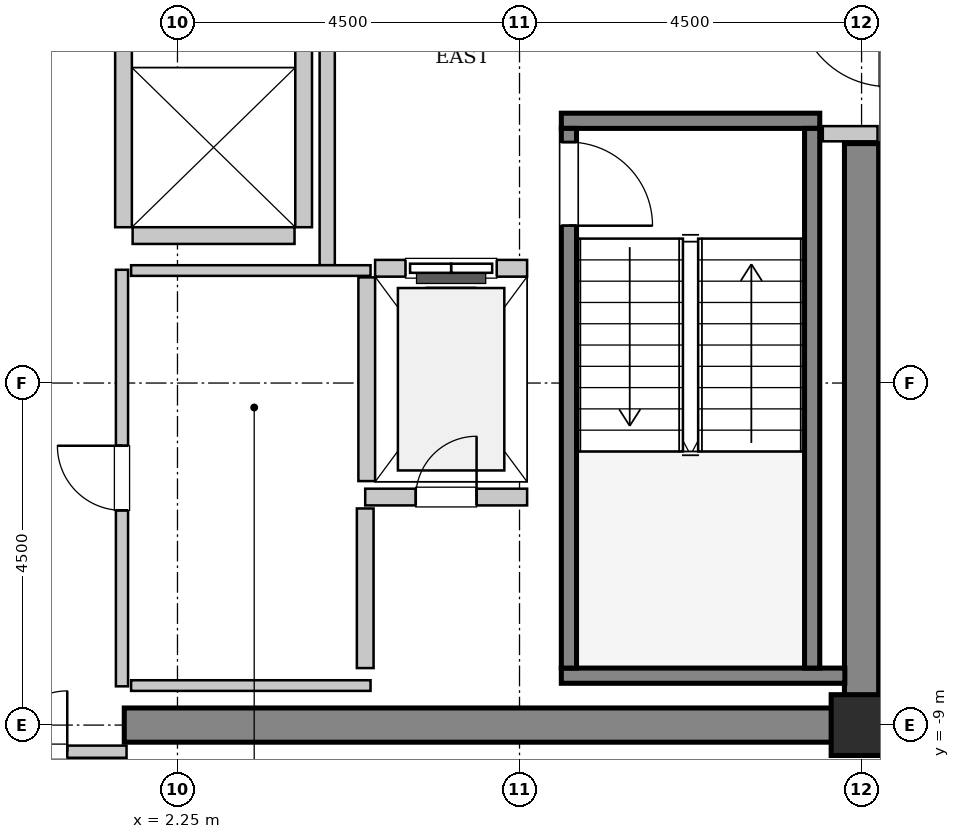
"""IFC4 building model, lengths in metres.
Left out: names, types, materials, properties, quantities, classifications, styles, units other than length and angle.
Written with IfcOpenShell. Run it as: python <this file> out.ifc"""

import sys

from ifc_helpers import new_model, si_unit, direction, frame, frame_2d, origin, origin_2d, place, context, subcontext, project, spatial, rectangle, hollow_rectangle, extrude, source, transform, mapped, element, fill, save


model = new_model("IFC4")
c1 = context("Model", 3, precision=1e-05, world=origin(), true_north=direction((0.0, 1.0)))
c2 = subcontext(c1, "Body", "Model", "MODEL_VIEW")
j1 = project(units=[si_unit("LENGTHUNIT", "METRE"), si_unit("PLANEANGLEUNIT", "RADIAN")], contexts=[c1])
p1 = place(None, origin())
s1 = spatial("IfcSite", under=j1, at=p1, CompositionType="ELEMENT")
p2 = place(p1, origin())
s2 = spatial("IfcBuilding", under=s1, at=p2, CompositionType="ELEMENT")
p3 = place(p2, frame((0.0, 0.0, 291.2)))
s3 = spatial("IfcBuildingStorey", under=s2, at=p3, CompositionType="ELEMENT", Elevation=291.2)
m1 = source(origin(), c2, "Body", "SweptSolid", [
    extrude(rectangle(XDim=9.925, YDim=0.45, at=frame_2d((4.962, 0.0))), origin(), (0.0, 0.0, 1.0), 3.8),
])
p4 = place(p3, frame((1.55, -9.0, 0.0), z_axis=(0.0, 0.0, 1.0), x_axis=(1.0, 0.0, 0.0)))
e1 = element("IfcWall", 1, at=p4, inside=s3, PredefinedType="SHEAR", context=c2, shape_type="MappedRepresentation", body=[
    mapped(m1, transform((0.0, 0.0, 0.0), x_axis=(1.0, 0.0, 0.0), y_axis=(0.0, 1.0, 0.0), z_axis=(0.0, 0.0, 1.0), scale=1.0)),
])
m2 = source(origin(), c2, "Body", "SweptSolid", [
    extrude(rectangle(XDim=7.425, YDim=0.45, at=frame_2d((3.712, 0.0))), origin(), (0.0, 0.0, 1.0), 3.8),
])
p5 = place(p3, frame((11.25, -8.775, 0.0), z_axis=(0.0, 0.0, 1.0), x_axis=(0.0, 1.0, 0.0)))
e2 = element("IfcWall", 2, at=p5, inside=s3, PredefinedType="SHEAR", context=c2, shape_type="MappedRepresentation", body=[
    mapped(m2, transform((0.0, 0.0, 0.0), x_axis=(1.0, 0.0, 0.0), y_axis=(0.0, 1.0, 0.0), z_axis=(0.0, 0.0, 1.0), scale=1.0)),
])
m3 = source(origin(), c2, "Body", "SweptSolid", [
    extrude(hollow_rectangle(XDim=0.8, YDim=0.8, WallThickness=0.04, InnerFilletRadius=0.04, OuterFilletRadius=0.08, at=origin_2d()), origin(), (0.0, 0.0, 1.0), 3.8),
])
p6 = place(p3, frame((11.25, -9.0, 0.0), z_axis=(0.0, 0.0, 1.0), x_axis=(1.0, 0.0, 0.0)))
e3 = element("IfcColumn", 3, at=p6, inside=s3, PredefinedType="COLUMN", context=c2, shape_type="MappedRepresentation", body=[
    mapped(m3, transform((0.0, 0.0, 0.0), x_axis=(1.0, 0.0, 0.0), y_axis=(0.0, 1.0, 0.0), z_axis=(0.0, 0.0, 1.0), scale=1.0)),
])
m4 = source(origin(), c2, "Body", "SweptSolid", [
    extrude(rectangle(XDim=3.4, YDim=0.2, at=frame_2d((1.7, 0.0))), origin(), (0.0, 0.0, 1.0), 3.8),
])
p7 = place(p3, frame((7.3, -1.05, 0.0), z_axis=(0.0, 0.0, 1.0), x_axis=(1.0, 0.0, 0.0)))
e4 = element("IfcWall", 4, at=p7, inside=s3, PredefinedType="SOLIDWALL", context=c2, shape_type="MappedRepresentation", body=[
    mapped(m4, transform((0.0, 0.0, 0.0), x_axis=(1.0, 0.0, 0.0), y_axis=(0.0, 1.0, 0.0), z_axis=(0.0, 0.0, 1.0), scale=1.0)),
])
m5 = source(origin(), c2, "Body", "SweptSolid", [
    extrude(rectangle(XDim=3.73, YDim=0.2, at=frame_2d((1.865, 0.0))), origin(), (0.0, 0.0, 1.0), 3.8),
])
p8 = place(p3, frame((7.3, -8.35, 0.0), z_axis=(0.0, 0.0, 1.0), x_axis=(1.0, 0.0, 0.0)))
e5 = element("IfcWall", 5, at=p8, inside=s3, PredefinedType="SOLIDWALL", context=c2, shape_type="MappedRepresentation", body=[
    mapped(m5, transform((0.0, 0.0, 0.0), x_axis=(1.0, 0.0, 0.0), y_axis=(0.0, 1.0, 0.0), z_axis=(0.0, 0.0, 1.0), scale=1.0)),
])
m6 = source(origin(), c2, "Body", "SweptSolid", [
    extrude(rectangle(XDim=7.1, YDim=0.2, at=frame_2d((3.55, 0.0))), origin(), (0.0, 0.0, 1.0), 3.8),
])
p9 = place(p3, frame((7.4, -1.15, 0.0), z_axis=(0.0, 0.0, 1.0), x_axis=(0.0, -1.0, 0.0)))
e6 = element("IfcWall", 6, at=p9, inside=s3, PredefinedType="SOLIDWALL", context=c2, shape_type="MappedRepresentation", body=[
    mapped(m6, transform((0.0, 0.0, 0.0), x_axis=(1.0, 0.0, 0.0), y_axis=(0.0, 1.0, 0.0), z_axis=(0.0, 0.0, 1.0), scale=1.0)),
])
p10 = place(p9, frame((0.18, 0.0, 0.0)))
e7 = element("IfcOpeningElement", 7, at=p10, cuts=e6, PredefinedType="OPENING", context=c2, shape_type="SweptSolid", body=[
    extrude(rectangle(XDim=1.1, YDim=2.15, at=frame_2d((0.55, 1.075))), frame((0.0, 0.11, 0.0), z_axis=(0.0, -1.0, 0.0), x_axis=(1.0, 0.0, 0.0)), (0.0, 0.0, 1.0), 0.22),
])
p11 = place(p3, frame((10.6, -1.15, 0.0), z_axis=(0.0, 0.0, 1.0), x_axis=(0.0, -1.0, 0.0)))
e8 = element("IfcWall", 8, at=p11, inside=s3, PredefinedType="SOLIDWALL", context=c2, shape_type="MappedRepresentation", body=[
    mapped(m6, transform((0.0, 0.0, 0.0), x_axis=(1.0, 0.0, 0.0), y_axis=(0.0, 1.0, 0.0), z_axis=(0.0, 0.0, 1.0), scale=1.0)),
])
m7 = source(origin(), c2, "Body", "SweptSolid", [
    extrude(rectangle(XDim=2.0, YDim=0.22, at=frame_2d((1.0, 0.0))), origin(), (0.0, 0.0, 1.0), 3.535),
])
p12 = place(p3, frame((6.85, -2.99, 0.0), z_axis=(0.0, 0.0, 1.0), x_axis=(-1.0, 0.0, 0.0)))
e9 = element("IfcWall", 9, at=p12, inside=s3, PredefinedType="SOLIDWALL", context=c2, shape_type="MappedRepresentation", body=[
    mapped(m7, transform((0.0, 0.0, 0.0), x_axis=(1.0, 0.0, 0.0), y_axis=(0.0, 1.0, 0.0), z_axis=(0.0, 0.0, 1.0), scale=1.0)),
])
p13 = place(p12, frame((0.4, 0.0, 0.0)))
e10 = element("IfcOpeningElement", 10, at=p13, cuts=e9, PredefinedType="OPENING", context=c2, shape_type="SweptSolid", body=[
    extrude(rectangle(XDim=1.2, YDim=2.2, at=frame_2d((0.6, 1.1))), frame((0.0, 0.12, 0.0), z_axis=(0.0, -1.0, 0.0), x_axis=(1.0, 0.0, 0.0)), (0.0, 0.0, 1.0), 0.24),
])
m8 = source(origin(), c2, "Body", "SweptSolid", [
    extrude(rectangle(XDim=2.68, YDim=0.22, at=frame_2d((1.34, 0.0))), origin(), (0.0, 0.0, 1.0), 3.535),
])
p14 = place(p3, frame((4.74, -3.11, 0.0), z_axis=(0.0, 0.0, 1.0), x_axis=(0.0, -1.0, 0.0)))
e11 = element("IfcWall", 11, at=p14, inside=s3, PredefinedType="SOLIDWALL", context=c2, shape_type="MappedRepresentation", body=[
    mapped(m8, transform((0.0, 0.0, 0.0), x_axis=(1.0, 0.0, 0.0), y_axis=(0.0, 1.0, 0.0), z_axis=(0.0, 0.0, 1.0), scale=1.0)),
])
m9 = source(origin(), c2, "Body", "SweptSolid", [
    extrude(rectangle(XDim=4.9, YDim=0.22, at=frame_2d((2.45, 0.0))), origin(), (0.0, 0.0, 1.0), 3.535),
])
for number, where, z_axis, x_axis in (
    (12, (1.54, 2.45, 0.0), (0.0, 0.0, 1.0), (0.0, -1.0, 0.0)),
    (13, (3.91, -2.45, 0.0), (0.0, 0.0, 1.0), (0.0, 1.0, 0.0)),
):
    element("IfcWall", number, at=place(p3, frame(where, z_axis=z_axis, x_axis=x_axis)), inside=s3, PredefinedType="SOLIDWALL", context=c2, shape_type="MappedRepresentation", body=[
        mapped(m9, transform((0.0, 0.0, 0.0), x_axis=(1.0, 0.0, 0.0), y_axis=(0.0, 1.0, 0.0), z_axis=(0.0, 0.0, 1.0), scale=1.0)),
    ])
m10 = source(origin(), c2, "Body", "SweptSolid", [
    extrude(rectangle(XDim=2.13, YDim=0.22, at=frame_2d((1.065, 0.0))), origin(), (0.0, 0.0, 1.0), 3.535),
])
p15 = place(p3, frame((1.66, -2.56, 0.0), z_axis=(0.0, 0.0, 1.0), x_axis=(1.0, 0.0, 0.0)))
e14 = element("IfcWall", 14, at=p15, inside=s3, PredefinedType="SOLIDWALL", context=c2, shape_type="MappedRepresentation", body=[
    mapped(m10, transform((0.0, 0.0, 0.0), x_axis=(1.0, 0.0, 0.0), y_axis=(0.0, 1.0, 0.0), z_axis=(0.0, 0.0, 1.0), scale=1.0)),
])
p16 = place(p3, frame((4.72, -6.0, 0.0), z_axis=(0.0, 0.0, 1.0), x_axis=(1.0, 0.0, 0.0)))
e15 = element("IfcWall", 15, at=p16, inside=s3, PredefinedType="SOLIDWALL", context=c2, shape_type="MappedRepresentation", body=[
    mapped(m10, transform((0.0, 0.0, 0.0), x_axis=(1.0, 0.0, 0.0), y_axis=(0.0, 1.0, 0.0), z_axis=(0.0, 0.0, 1.0), scale=1.0)),
])
p17 = place(p16, frame((0.665, 0.0, 0.0)))
e16 = element("IfcOpeningElement", 16, at=p17, cuts=e15, PredefinedType="OPENING", context=c2, shape_type="SweptSolid", body=[
    extrude(rectangle(XDim=0.8, YDim=2.0, at=frame_2d((0.4, 1.0))), frame((0.0, 0.12, 0.0), z_axis=(0.0, -1.0, 0.0), x_axis=(1.0, 0.0, 0.0)), (0.0, 0.0, 1.0), 0.24),
])
m11 = source(origin(), c2, "Body", "SweptSolid", [
    extrude(rectangle(XDim=2.1, YDim=0.22, at=frame_2d((1.05, 0.0))), origin(), (0.0, 0.0, 1.0), 3.535),
])
p18 = place(p3, frame((4.72, -8.25, 0.0), z_axis=(0.0, 0.0, 1.0), x_axis=(0.0, 1.0, 0.0)))
e17 = element("IfcWall", 17, at=p18, inside=s3, PredefinedType="SOLIDWALL", context=c2, shape_type="MappedRepresentation", body=[
    mapped(m11, transform((0.0, 0.0, 0.0), x_axis=(1.0, 0.0, 0.0), y_axis=(0.0, 1.0, 0.0), z_axis=(0.0, 0.0, 1.0), scale=1.0)),
])
m12 = source(origin(), c2, "Body", "SweptSolid", [
    extrude(rectangle(XDim=5.9, YDim=0.2, at=frame_2d((2.95, 0.0))), origin(), (0.0, 0.0, 1.0), 3.535),
])
p19 = place(p3, frame((4.22, -2.95, 0.0), z_axis=(0.0, 0.0, 1.0), x_axis=(0.0, 1.0, 0.0)))
e18 = element("IfcWall", 18, at=p19, inside=s3, PredefinedType="PARTITIONING", context=c2, shape_type="MappedRepresentation", body=[
    mapped(m12, transform((0.0, 0.0, 0.0), x_axis=(1.0, 0.0, 0.0), y_axis=(0.0, 1.0, 0.0), z_axis=(0.0, 0.0, 1.0), scale=1.0)),
])
m13 = source(origin(), c2, "Body", "SweptSolid", [
    extrude(rectangle(XDim=0.72, YDim=0.2, at=frame_2d((0.36, 0.0))), origin(), (0.0, 0.0, 1.0), 3.535),
])
p20 = place(p3, frame((10.74, -1.22, 0.0), z_axis=(0.0, 0.0, 1.0), x_axis=(1.0, 0.0, 0.0)))
e19 = element("IfcWall", 19, at=p20, inside=s3, PredefinedType="PARTITIONING", context=c2, shape_type="MappedRepresentation", body=[
    mapped(m13, transform((0.0, 0.0, 0.0), x_axis=(1.0, 0.0, 0.0), y_axis=(0.0, 1.0, 0.0), z_axis=(0.0, 0.0, 1.0), scale=1.0)),
])
m14 = source(origin(), c2, "Body", "SweptSolid", [
    extrude(rectangle(XDim=3.16, YDim=0.16, at=frame_2d((1.58, 0.0))), origin(), (0.0, 0.0, 1.0), 2.625),
])
p21 = place(p3, frame((-1.58, -9.35, 0.0), z_axis=(0.0, 0.0, 1.0), x_axis=(1.0, 0.0, 0.0)))
e20 = element("IfcWall", 20, at=p21, inside=s3, PredefinedType="PARTITIONING", context=c2, shape_type="MappedRepresentation", body=[
    mapped(m14, transform((0.0, 0.0, 0.0), x_axis=(1.0, 0.0, 0.0), y_axis=(0.0, 1.0, 0.0), z_axis=(0.0, 0.0, 1.0), scale=1.0)),
])
p22 = place(p21, frame((0.78, 0.0, 0.0)))
e21 = element("IfcOpeningElement", 21, at=p22, cuts=e20, PredefinedType="OPENING", context=c2, shape_type="SweptSolid", body=[
    extrude(rectangle(XDim=1.6, YDim=2.3, at=frame_2d((0.8, 1.15))), frame((0.0, 0.09, 0.0), z_axis=(0.0, -1.0, 0.0), x_axis=(1.0, 0.0, 0.0)), (0.0, 0.0, 1.0), 0.18),
])
m15 = source(origin(), c2, "Body", "SweptSolid", [
    extrude(rectangle(XDim=5.48, YDim=0.16, at=frame_2d((2.74, 0.0))), origin(), (0.0, 0.0, 1.0), 3.535),
])
p23 = place(p3, frame((1.52, -8.49, 0.0), z_axis=(0.0, 0.0, 1.0), x_axis=(0.0, 1.0, 0.0)))
e22 = element("IfcWall", 22, at=p23, inside=s3, PredefinedType="PARTITIONING", context=c2, shape_type="MappedRepresentation", body=[
    mapped(m15, transform((0.0, 0.0, 0.0), x_axis=(1.0, 0.0, 0.0), y_axis=(0.0, 1.0, 0.0), z_axis=(0.0, 0.0, 1.0), scale=1.0)),
])
p24 = place(p23, frame((2.315, 0.0, 0.0)))
e23 = element("IfcOpeningElement", 23, at=p24, cuts=e22, PredefinedType="OPENING", context=c2, shape_type="SweptSolid", body=[
    extrude(rectangle(XDim=0.85, YDim=2.1, at=frame_2d((0.425, 1.05))), frame((0.0, 0.09, 0.0), z_axis=(0.0, -1.0, 0.0), x_axis=(1.0, 0.0, 0.0)), (0.0, 0.0, 1.0), 0.18),
])
m16 = source(origin(), c2, "Body", "SweptSolid", [
    extrude(rectangle(XDim=3.15, YDim=0.14, at=frame_2d((1.575, 0.0))), origin(), (0.0, 0.0, 1.0), 3.535),
])
for number, where, z_axis, x_axis in (
    (24, (1.64, -3.02, 0.0), (0.0, 0.0, 1.0), (1.0, 0.0, 0.0)),
    (25, (1.64, -8.48, 0.0), (0.0, 0.0, 1.0), (1.0, 0.0, 0.0)),
):
    element("IfcWall", number, at=place(p3, frame(where, z_axis=z_axis, x_axis=x_axis)), inside=s3, PredefinedType="PARTITIONING", context=c2, shape_type="MappedRepresentation", body=[
        mapped(m16, transform((0.0, 0.0, 0.0), x_axis=(1.0, 0.0, 0.0), y_axis=(0.0, 1.0, 0.0), z_axis=(0.0, 0.0, 1.0), scale=1.0)),
    ])
m17 = source(origin(), c2, "Body", "SweptSolid", [
    extrude(rectangle(XDim=1.1, YDim=2.15, at=frame_2d((0.55, 1.075))), frame((0.0, 0.025, 0.0), z_axis=(0.0, -1.0, 0.0), x_axis=(1.0, 0.0, 0.0)), (0.0, 0.0, 1.0), 0.05),
])
p25 = place(p10, origin())
e26 = element("IfcDoor", 26, at=p25, inside=s3, OperationType="SINGLE_SWING_RIGHT", PredefinedType="DOOR", context=c2, shape_type="MappedRepresentation", body=[
    mapped(m17, transform((0.0, 0.0, 0.0), x_axis=(1.0, 0.0, 0.0), y_axis=(0.0, 1.0, 0.0), z_axis=(0.0, 0.0, 1.0), scale=1.0)),
])
fill(e7, e26)
m18 = source(origin(), c2, "Body", "SweptSolid", [
    extrude(rectangle(XDim=1.2, YDim=2.2, at=frame_2d((0.6, 1.1))), frame((0.0, 0.025, 0.0), z_axis=(0.0, -1.0, 0.0), x_axis=(1.0, 0.0, 0.0)), (0.0, 0.0, 1.0), 0.05),
])
p26 = place(p13, origin())
e27 = element("IfcDoor", 27, at=p26, inside=s3, OperationType="SLIDING_TO_LEFT", PredefinedType="DOOR", context=c2, shape_type="MappedRepresentation", body=[
    mapped(m18, transform((0.0, 0.0, 0.0), x_axis=(1.0, 0.0, 0.0), y_axis=(0.0, 1.0, 0.0), z_axis=(0.0, 0.0, 1.0), scale=1.0)),
])
fill(e10, e27)
m19 = source(origin(), c2, "Body", "SweptSolid", [
    extrude(rectangle(XDim=0.8, YDim=2.0, at=frame_2d((0.4, 1.0))), frame((0.0, 0.025, 0.0), z_axis=(0.0, -1.0, 0.0), x_axis=(1.0, 0.0, 0.0)), (0.0, 0.0, 1.0), 0.05),
])
p27 = place(p17, origin())
e28 = element("IfcDoor", 28, at=p27, inside=s3, OperationType="SINGLE_SWING_RIGHT", PredefinedType="TRAPDOOR", context=c2, shape_type="MappedRepresentation", body=[
    mapped(m19, transform((0.0, 0.0, 0.0), x_axis=(1.0, 0.0, 0.0), y_axis=(0.0, 1.0, 0.0), z_axis=(0.0, 0.0, 1.0), scale=1.0)),
])
fill(e16, e28)
m20 = source(origin(), c2, "Body", "SweptSolid", [
    extrude(rectangle(XDim=1.6, YDim=2.3, at=frame_2d((0.8, 1.15))), frame((0.0, 0.025, 0.0), z_axis=(0.0, -1.0, 0.0), x_axis=(1.0, 0.0, 0.0)), (0.0, 0.0, 1.0), 0.05),
])
p28 = place(p22, origin())
e29 = element("IfcDoor", 29, at=p28, inside=s3, OperationType="DOUBLE_DOOR_SINGLE_SWING", PredefinedType="DOOR", context=c2, shape_type="MappedRepresentation", body=[
    mapped(m20, transform((0.0, 0.0, 0.0), x_axis=(1.0, 0.0, 0.0), y_axis=(0.0, 1.0, 0.0), z_axis=(0.0, 0.0, 1.0), scale=1.0)),
])
fill(e21, e29)
m21 = source(origin(), c2, "Body", "SweptSolid", [
    extrude(rectangle(XDim=0.85, YDim=2.1, at=frame_2d((0.425, 1.05))), frame((0.0, 0.025, 0.0), z_axis=(0.0, -1.0, 0.0), x_axis=(1.0, 0.0, 0.0)), (0.0, 0.0, 1.0), 0.05),
])
p29 = place(p24, origin())
e30 = element("IfcDoor", 30, at=p29, inside=s3, OperationType="SINGLE_SWING_RIGHT", PredefinedType="DOOR", context=c2, shape_type="MappedRepresentation", body=[
    mapped(m21, transform((0.0, 0.0, 0.0), x_axis=(1.0, 0.0, 0.0), y_axis=(0.0, 1.0, 0.0), z_axis=(0.0, 0.0, 1.0), scale=1.0)),
])
fill(e23, e30)
save(model, sys.argv[1])
